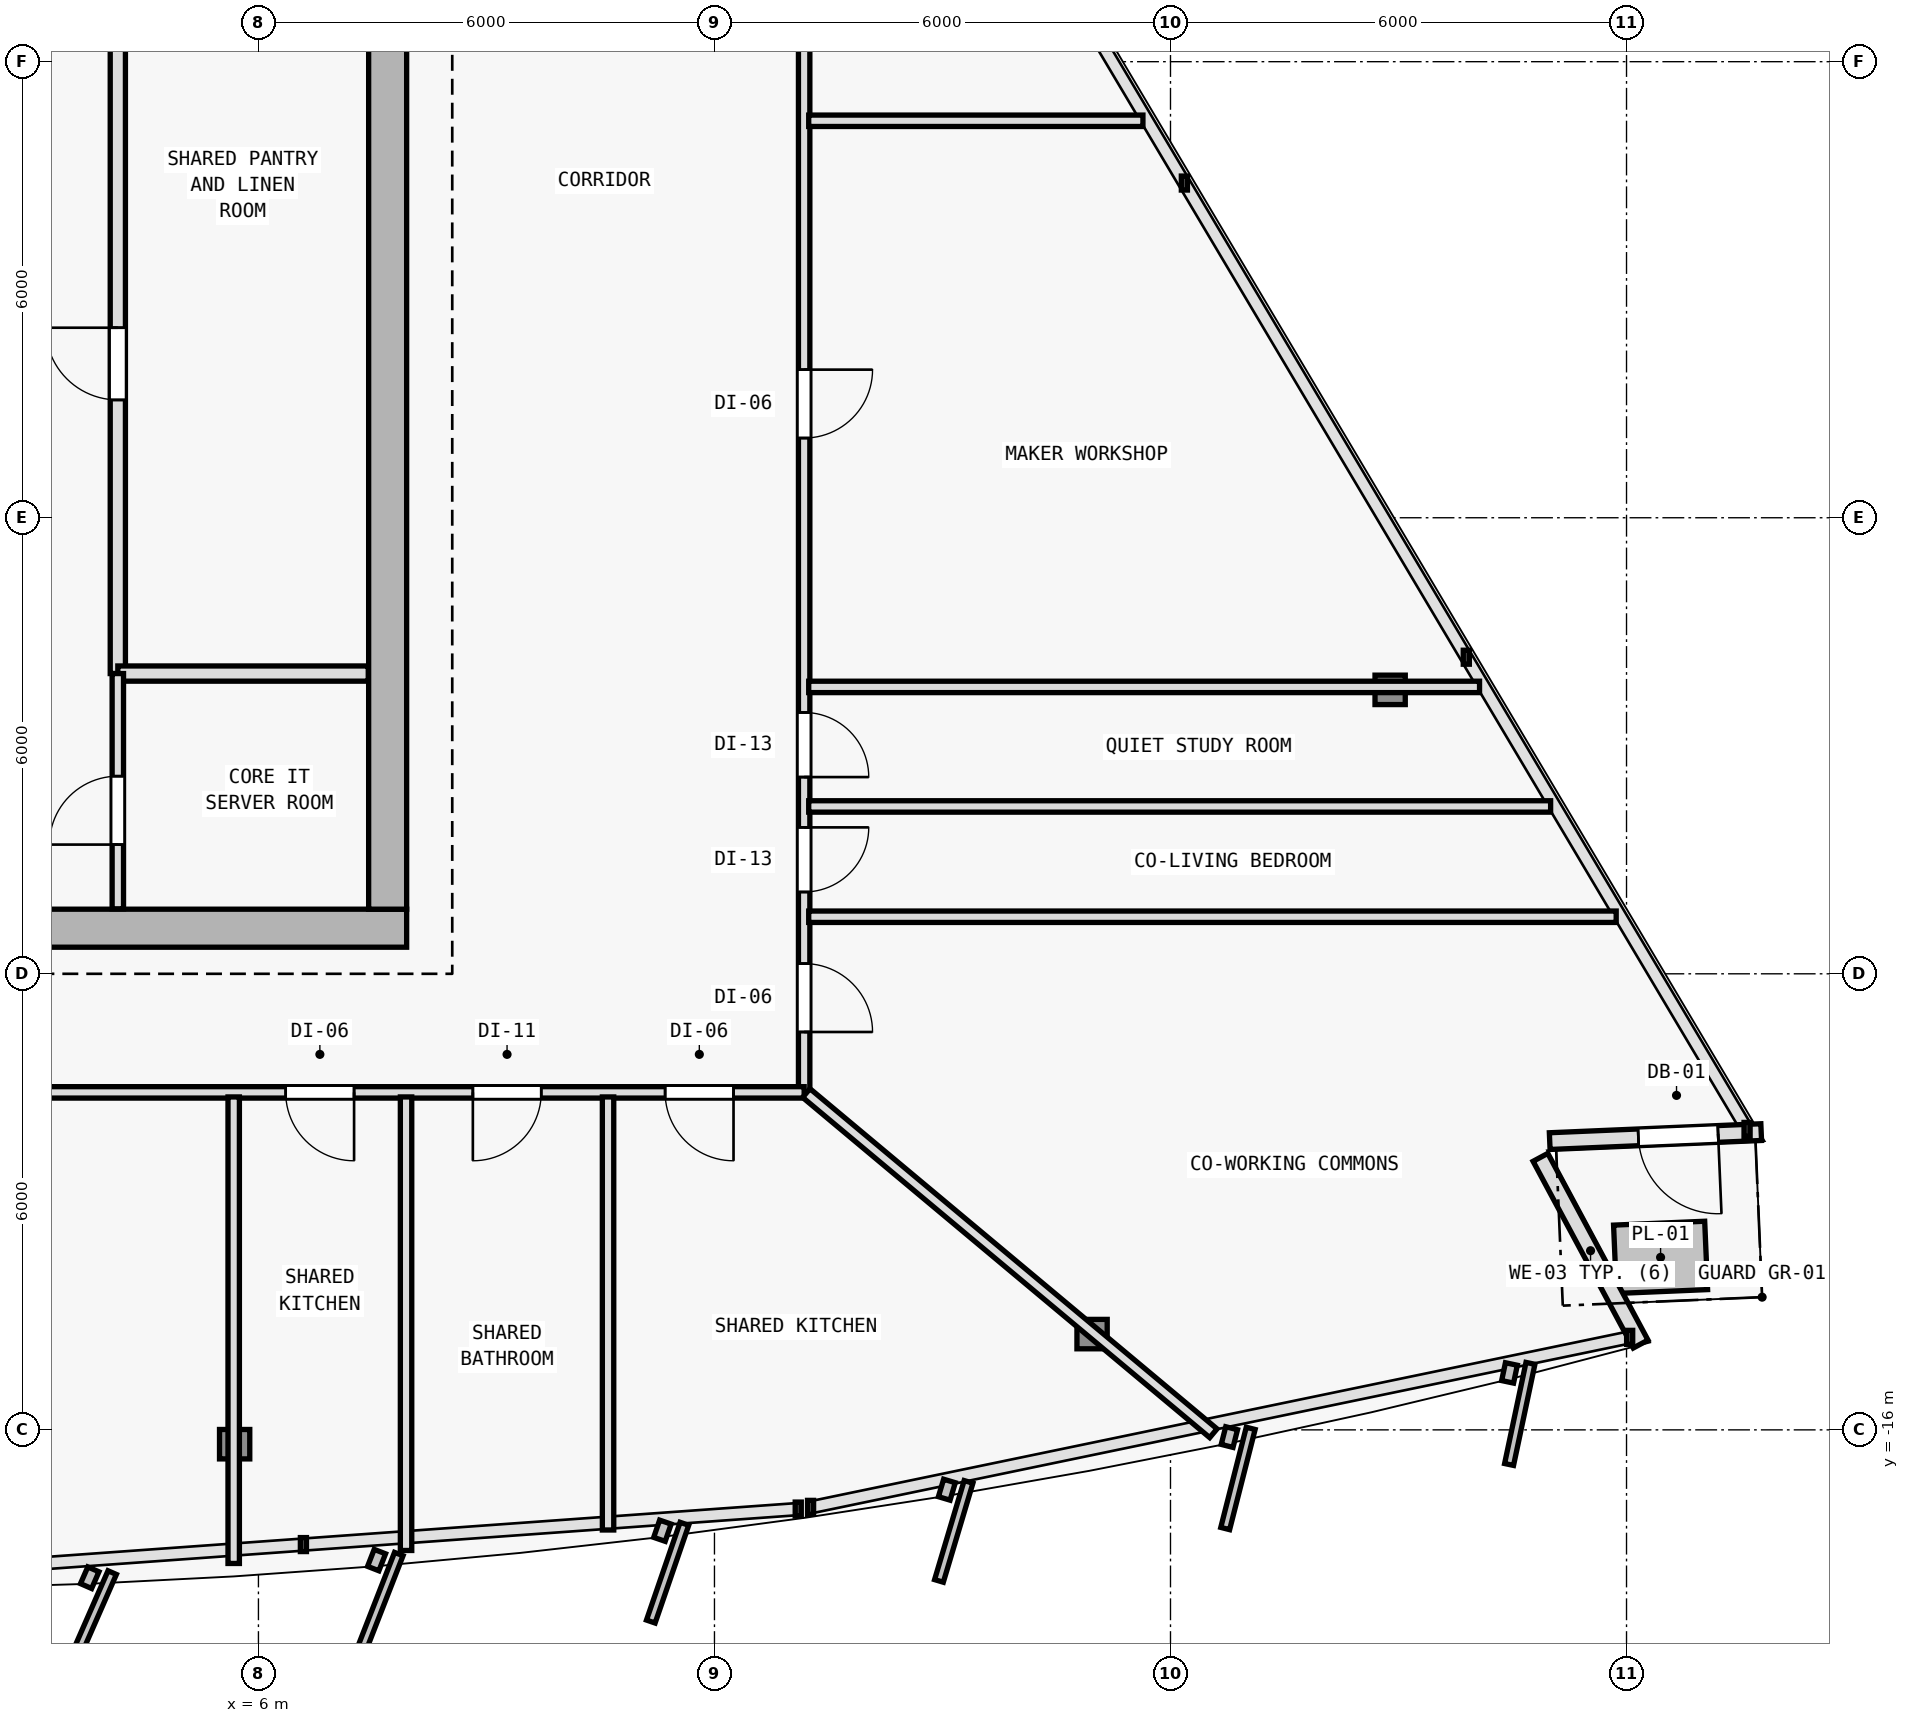
"""IFC4 building model, lengths in metres.
Left out: names, types, materials, properties, quantities, classifications, styles, units other than length and angle.
Written with IfcOpenShell. Run it as: python <this file> out.ifc"""

import sys

from ifc_helpers import new_model, si_unit, direction, frame, frame_2d, origin, origin_2d, place, context, subcontext, project, spatial, rectangle, i_section, extrude, element, fill, save


model = new_model("IFC4")
c1 = context("Model", 3, precision=1e-05, world=origin(), true_north=direction((0.0, 1.0)))
c2 = subcontext(c1, "Body", "Model", "MODEL_VIEW")
j1 = project(units=[si_unit("LENGTHUNIT", "METRE"), si_unit("PLANEANGLEUNIT", "RADIAN")], contexts=[c1])
p1 = place(None, origin())
s1 = spatial("IfcSite", under=j1, at=p1, CompositionType="ELEMENT")
p2 = place(p1, origin())
s2 = spatial("IfcBuilding", under=s1, at=p2, CompositionType="ELEMENT")
p3 = place(p2, frame((0.0, 0.0, 198.3)))
s3 = spatial("IfcBuildingStorey", under=s2, at=p3, CompositionType="ELEMENT", Elevation=198.3)
for number, where, z_axis, x_axis in (
    (1, (7.7, -9.4, 0.0), (0.0, 0.0, 1.0), (1.0, 0.0, 0.0)),
    (2, (7.7, 0.4, 0.0), (0.0, 0.0, 1.0), (1.0, 0.0, 0.0)),
):
    element("IfcColumn", number, at=place(p3, frame(where, z_axis=z_axis, x_axis=x_axis)), inside=s3, PredefinedType="COLUMN", context=c2, shape_type="SweptSolid", body=[
        extrude(i_section(OverallWidth=0.398, OverallDepth=0.387, WebThickness=0.013, FlangeThickness=0.022, FilletRadius=0.015, at=origin_2d()), origin(), (0.0, 0.0, 1.0), 3.6),
    ])
p4 = place(p3, frame((5.687, -16.188, 0.005), z_axis=(-0.00693381708, 0.03528089279, 0.999353381334), x_axis=(-0.981229659911, -0.192842823335, 0.0)))
e3 = element("IfcColumn", 3, at=p4, inside=s3, PredefinedType="COLUMN", context=c2, shape_type="SweptSolid", body=[
    extrude(i_section(OverallWidth=0.398, OverallDepth=0.387, WebThickness=0.013, FlangeThickness=0.022, FilletRadius=0.015, at=origin_2d()), origin(), (0.0, 0.0, 1.0), 3.592),
])
p5 = place(p3, frame((16.968, -14.74, 0.005), z_axis=(-0.020594893987, 0.033509183946, 0.999226193078), x_axis=(-0.851954850327, -0.523615252838, 0.0)))
e4 = element("IfcColumn", 4, at=p5, inside=s3, PredefinedType="COLUMN", context=c2, shape_type="SweptSolid", body=[
    extrude(i_section(OverallWidth=0.398, OverallDepth=0.387, WebThickness=0.013, FlangeThickness=0.022, FilletRadius=0.015, at=origin_2d()), origin(), (0.0, 0.0, 1.0), 3.592),
])
p6 = place(p3, frame((20.89, -6.264, 0.005), z_axis=(-0.026105663043, 0.021618752208, 0.999425396871), x_axis=(-0.637813971185, -0.770190455771, 0.0)))
e5 = element("IfcColumn", 5, at=p6, inside=s3, PredefinedType="COLUMN", context=c2, shape_type="SweptSolid", body=[
    extrude(i_section(OverallWidth=0.398, OverallDepth=0.387, WebThickness=0.013, FlangeThickness=0.022, FilletRadius=0.015, at=origin_2d()), origin(), (0.0, 0.0, 1.0), 3.591),
])
p7 = place(p3, frame((22.868, -12.415, 0.0), z_axis=(0.0, 0.0, 1.0), x_axis=(0.472845900162, -0.881145138272, 0.0)))
e6 = element("IfcWall", 6, at=p7, inside=s3, PredefinedType="SOLIDWALL", context=c2, shape_type="SweptSolid", body=[
    extrude(rectangle(XDim=2.788, YDim=0.22, at=frame_2d((1.394, 0.0))), origin(), (0.0, 0.0, 1.0), 3.35),
])
p8 = place(p3, frame((25.772, -12.083, 0.0), z_axis=(0.0, 0.0, 1.0), x_axis=(-0.999095761456, -0.042516578425, 0.0)))
e7 = element("IfcWall", 7, at=p8, inside=s3, PredefinedType="SOLIDWALL", context=c2, shape_type="SweptSolid", body=[
    extrude(rectangle(XDim=2.785, YDim=0.22, at=frame_2d((1.393, 0.0))), origin(), (0.0, 0.0, 1.0), 3.35),
])
p9 = place(p8, frame((0.567, 0.0, 0.0)))
e8 = element("IfcOpeningElement", 8, at=p9, cuts=e7, PredefinedType="OPENING", context=c2, shape_type="SweptSolid", body=[
    extrude(rectangle(XDim=1.05, YDim=2.15, at=frame_2d((0.525, 1.075))), frame((0.0, 0.12, 0.0), z_axis=(0.0, -1.0, 0.0), x_axis=(1.0, 0.0, 0.0)), (0.0, 0.0, 1.0), 0.24),
])
p10 = place(p3, frame((-7.95, -9.4, 0.0), z_axis=(0.0, 0.0, 1.0), x_axis=(1.0, 0.0, 0.0)))
e9 = element("IfcWall", 9, at=p10, inside=s3, PredefinedType="SHEAR", context=c2, shape_type="SweptSolid", body=[
    extrude(rectangle(XDim=15.9, YDim=0.5, at=frame_2d((7.95, 0.0))), origin(), (0.0, 0.0, 1.0), 3.35),
])
p11 = place(p10, frame((9.6, 0.0, 0.0)))
e10 = element("IfcOpeningElement", 10, at=p11, cuts=e9, PredefinedType="OPENING", context=c2, shape_type="SweptSolid", body=[
    extrude(rectangle(XDim=1.5, YDim=2.2, at=frame_2d((0.75, 1.1))), frame((0.0, 0.26, 0.0), z_axis=(0.0, -1.0, 0.0), x_axis=(1.0, 0.0, 0.0)), (0.0, 0.0, 1.0), 0.52),
])
p12 = place(p3, frame((7.7, 9.95, 0.0), z_axis=(0.0, 0.0, 1.0), x_axis=(0.0, -1.0, 0.0)))
e11 = element("IfcWall", 11, at=p12, inside=s3, PredefinedType="SHEAR", context=c2, shape_type="SweptSolid", body=[
    extrude(rectangle(XDim=19.1, YDim=0.5, at=frame_2d((9.55, 0.0))), origin(), (0.0, 0.0, 1.0), 3.35),
])
p13 = place(p3, frame((4.15, -6.05, 0.0), z_axis=(0.0, 0.0, 1.0), x_axis=(0.0, 1.0, 0.0)))
e12 = element("IfcWall", 12, at=p13, inside=s3, PredefinedType="SOLIDWALL", context=c2, shape_type="SweptSolid", body=[
    extrude(rectangle(XDim=8.7, YDim=0.2, at=frame_2d((4.35, 0.0))), origin(), (0.0, 0.0, 1.0), 3.35),
])
p14 = place(p13, frame((3.6, 0.0, 0.0)))
e13 = element("IfcOpeningElement", 13, at=p14, cuts=e12, PredefinedType="OPENING", context=c2, shape_type="SweptSolid", body=[
    extrude(rectangle(XDim=0.95, YDim=2.1, at=frame_2d((0.475, 1.05))), frame((0.0, 0.11, 0.0), z_axis=(0.0, -1.0, 0.0), x_axis=(1.0, 0.0, 0.0)), (0.0, 0.0, 1.0), 0.22),
])
p15 = place(p3, frame((4.15, -6.05, 0.0), z_axis=(0.0, 0.0, 1.0), x_axis=(1.0, 0.0, 0.0)))
e14 = element("IfcWall", 14, at=p15, inside=s3, PredefinedType="SOLIDWALL", context=c2, shape_type="SweptSolid", body=[
    extrude(rectangle(XDim=3.295, YDim=0.2, at=frame_2d((1.647, 0.0))), origin(), (0.0, 0.0, 1.0), 3.35),
])
p16 = place(p3, frame((4.15, -9.145, 0.0), z_axis=(0.0, 0.0, 1.0), x_axis=(0.0, 1.0, 0.0)))
e15 = element("IfcWall", 15, at=p16, inside=s3, PredefinedType="PARTITIONING", context=c2, shape_type="SweptSolid", body=[
    extrude(rectangle(XDim=3.095, YDim=0.15, at=frame_2d((1.547, 0.0))), origin(), (0.0, 0.0, 1.0), 3.35),
])
p17 = place(p16, frame((0.845, 0.0, 0.0)))
e16 = element("IfcOpeningElement", 16, at=p17, cuts=e15, PredefinedType="OPENING", context=c2, shape_type="SweptSolid", body=[
    extrude(rectangle(XDim=0.9, YDim=2.1, at=frame_2d((0.45, 1.05))), frame((0.0, 0.085, 0.0), z_axis=(0.0, -1.0, 0.0), x_axis=(1.0, 0.0, 0.0)), (0.0, 0.0, 1.0), 0.17),
])
p18 = place(p3, frame((13.18, 8.444, 0.0), z_axis=(0.0, 0.0, 1.0), x_axis=(0.0, -1.0, 0.0)))
e17 = element("IfcWall", 17, at=p18, inside=s3, PredefinedType="PARTITIONING", context=c2, shape_type="SweptSolid", body=[
    extrude(rectangle(XDim=20.004, YDim=0.15, at=frame_2d((10.002, 0.0))), origin(), (0.0, 0.0, 1.0), 2.825),
])
p19 = place(p18, frame((18.309, 0.0, 0.0)))
e18 = element("IfcOpeningElement", 18, at=p19, cuts=e17, PredefinedType="OPENING", context=c2, shape_type="SweptSolid", body=[
    extrude(rectangle(XDim=0.9, YDim=2.1, at=frame_2d((0.45, 1.05))), frame((0.0, 0.085, 0.0), z_axis=(0.0, -1.0, 0.0), x_axis=(1.0, 0.0, 0.0)), (0.0, 0.0, 1.0), 0.17),
])
p20 = place(p18, frame((16.518, 0.0, 0.0)))
e19 = element("IfcOpeningElement", 19, at=p20, cuts=e17, PredefinedType="OPENING", context=c2, shape_type="SweptSolid", body=[
    extrude(rectangle(XDim=0.85, YDim=2.1, at=frame_2d((0.425, 1.05))), frame((0.0, 0.085, 0.0), z_axis=(0.0, -1.0, 0.0), x_axis=(1.0, 0.0, 0.0)), (0.0, 0.0, 1.0), 0.17),
])
p21 = place(p18, frame((15.006, 0.0, 0.0)))
e20 = element("IfcOpeningElement", 20, at=p21, cuts=e17, PredefinedType="OPENING", context=c2, shape_type="SweptSolid", body=[
    extrude(rectangle(XDim=0.85, YDim=2.1, at=frame_2d((0.425, 1.05))), frame((0.0, 0.085, 0.0), z_axis=(0.0, -1.0, 0.0), x_axis=(1.0, 0.0, 0.0)), (0.0, 0.0, 1.0), 0.17),
])
p22 = place(p18, frame((10.495, 0.0, 0.0)))
e21 = element("IfcOpeningElement", 21, at=p22, cuts=e17, PredefinedType="OPENING", context=c2, shape_type="SweptSolid", body=[
    extrude(rectangle(XDim=0.9, YDim=2.1, at=frame_2d((0.45, 1.05))), frame((0.0, 0.085, 0.0), z_axis=(0.0, -1.0, 0.0), x_axis=(1.0, 0.0, 0.0)), (0.0, 0.0, 1.0), 0.17),
])
p23 = place(p3, frame((13.18, -11.56, 0.0), z_axis=(0.0, 0.0, 1.0), x_axis=(-1.0, 0.0, 0.0)))
e22 = element("IfcWall", 22, at=p23, inside=s3, PredefinedType="PARTITIONING", context=c2, shape_type="SweptSolid", body=[
    extrude(rectangle(XDim=23.04, YDim=0.15, at=frame_2d((11.52, 0.0))), origin(), (0.0, 0.0, 1.0), 2.725),
])
p24 = place(p23, frame((14.417, 0.0, 0.0)))
e23 = element("IfcOpeningElement", 23, at=p24, cuts=e22, PredefinedType="OPENING", context=c2, shape_type="SweptSolid", body=[
    extrude(rectangle(XDim=0.9, YDim=2.1, at=frame_2d((0.45, 1.05))), frame((0.0, 0.085, 0.0), z_axis=(0.0, -1.0, 0.0), x_axis=(1.0, 0.0, 0.0)), (0.0, 0.0, 1.0), 0.17),
])
p25 = place(p23, frame((5.922, 0.0, 0.0)))
e24 = element("IfcOpeningElement", 24, at=p25, cuts=e22, PredefinedType="OPENING", context=c2, shape_type="SweptSolid", body=[
    extrude(rectangle(XDim=0.9, YDim=2.1, at=frame_2d((0.45, 1.05))), frame((0.0, 0.085, 0.0), z_axis=(0.0, -1.0, 0.0), x_axis=(1.0, 0.0, 0.0)), (0.0, 0.0, 1.0), 0.17),
])
p26 = place(p23, frame((3.459, 0.0, 0.0)))
e25 = element("IfcOpeningElement", 25, at=p26, cuts=e22, PredefinedType="OPENING", context=c2, shape_type="SweptSolid", body=[
    extrude(rectangle(XDim=0.9, YDim=2.1, at=frame_2d((0.45, 1.05))), frame((0.0, 0.085, 0.0), z_axis=(0.0, -1.0, 0.0), x_axis=(1.0, 0.0, 0.0)), (0.0, 0.0, 1.0), 0.17),
])
p27 = place(p23, frame((0.929, 0.0, 0.0)))
e26 = element("IfcOpeningElement", 26, at=p27, cuts=e22, PredefinedType="OPENING", context=c2, shape_type="SweptSolid", body=[
    extrude(rectangle(XDim=0.9, YDim=2.1, at=frame_2d((0.45, 1.05))), frame((0.0, 0.085, 0.0), z_axis=(0.0, -1.0, 0.0), x_axis=(1.0, 0.0, 0.0)), (0.0, 0.0, 1.0), 0.17),
])
p28 = place(p3, frame((5.675, -11.62, 0.0), z_axis=(0.0, 0.0, 1.0), x_axis=(0.0, -1.0, 0.0)))
e27 = element("IfcWall", 27, at=p28, inside=s3, PredefinedType="PARTITIONING", context=c2, shape_type="SweptSolid", body=[
    extrude(rectangle(XDim=6.138, YDim=0.15, at=frame_2d((3.069, 0.0))), origin(), (0.0, 0.0, 1.0), 2.825),
])
p29 = place(p3, frame((13.208, -11.569, 0.0), z_axis=(0.0, 0.0, 1.0), x_axis=(0.767351890927, -0.641226228012, 0.0)))
e28 = element("IfcWall", 28, at=p29, inside=s3, PredefinedType="PARTITIONING", context=c2, shape_type="SweptSolid", body=[
    extrude(rectangle(XDim=6.98, YDim=0.15, at=frame_2d((3.49, 0.0))), origin(), (0.0, 0.0, 1.0), 2.825),
])
p30 = place(p3, frame((13.24, -6.226, 0.0), z_axis=(0.0, 0.0, 1.0), x_axis=(1.0, 0.0, 0.0)))
e29 = element("IfcWall", 29, at=p30, inside=s3, PredefinedType="PARTITIONING", context=c2, shape_type="SweptSolid", body=[
    extrude(rectangle(XDim=8.826, YDim=0.15, at=frame_2d((4.413, 0.0))), origin(), (0.0, 0.0, 1.0), 2.825),
])
p31 = place(p3, frame((10.6, -11.62, 0.0), z_axis=(0.0, 0.0, 1.0), x_axis=(0.0, -1.0, 0.0)))
e30 = element("IfcWall", 30, at=p31, inside=s3, PredefinedType="PARTITIONING", context=c2, shape_type="SweptSolid", body=[
    extrude(rectangle(XDim=5.697, YDim=0.15, at=frame_2d((2.849, 0.0))), origin(), (0.0, 0.0, 1.0), 2.825),
])
p32 = place(p3, frame((13.24, -9.249, 0.0), z_axis=(0.0, 0.0, 1.0), x_axis=(1.0, 0.0, 0.0)))
e31 = element("IfcWall", 31, at=p32, inside=s3, PredefinedType="PARTITIONING", context=c2, shape_type="SweptSolid", body=[
    extrude(rectangle(XDim=10.624, YDim=0.15, at=frame_2d((5.312, 0.0))), origin(), (0.0, 0.0, 1.0), 2.935),
])
p33 = place(p3, frame((7.942, -11.62, 0.0), z_axis=(0.0, 0.0, 1.0), x_axis=(0.0, -1.0, 0.0)))
e32 = element("IfcWall", 32, at=p33, inside=s3, PredefinedType="PARTITIONING", context=c2, shape_type="SweptSolid", body=[
    extrude(rectangle(XDim=5.967, YDim=0.15, at=frame_2d((2.983, 0.0))), origin(), (0.0, 0.0, 1.0), 2.825),
])
p34 = place(p3, frame((13.24, -7.798, 0.0), z_axis=(0.0, 0.0, 1.0), x_axis=(1.0, 0.0, 0.0)))
e33 = element("IfcWall", 33, at=p34, inside=s3, PredefinedType="PARTITIONING", context=c2, shape_type="SweptSolid", body=[
    extrude(rectangle(XDim=9.761, YDim=0.15, at=frame_2d((4.881, 0.0))), origin(), (0.0, 0.0, 1.0), 2.825),
])
p35 = place(p3, frame((13.24, 1.222, 0.0), z_axis=(0.0, 0.0, 1.0), x_axis=(1.0, 0.0, 0.0)))
e34 = element("IfcWall", 34, at=p35, inside=s3, PredefinedType="PARTITIONING", context=c2, shape_type="SweptSolid", body=[
    extrude(rectangle(XDim=4.397, YDim=0.15, at=frame_2d((2.199, 0.0))), origin(), (0.0, 0.0, 1.0), 2.935),
])
p36 = place(p9, origin())
e35 = element("IfcDoor", 35, at=p36, inside=s3, OperationType="SINGLE_SWING_LEFT", PredefinedType="DOOR", context=c2, shape_type="SweptSolid", body=[
    extrude(rectangle(XDim=1.05, YDim=2.15, at=frame_2d((0.525, 1.075))), frame((0.0, 0.025, 0.0), z_axis=(0.0, -1.0, 0.0), x_axis=(1.0, 0.0, 0.0)), (0.0, 0.0, 1.0), 0.05),
])
fill(e8, e35)
p37 = place(p14, origin())
e36 = element("IfcDoor", 36, at=p37, inside=s3, OperationType="SINGLE_SWING_RIGHT", PredefinedType="DOOR", context=c2, shape_type="SweptSolid", body=[
    extrude(rectangle(XDim=0.95, YDim=2.1, at=frame_2d((0.475, 1.05))), frame((0.0, 0.025, 0.0), z_axis=(0.0, -1.0, 0.0), x_axis=(1.0, 0.0, 0.0)), (0.0, 0.0, 1.0), 0.05),
])
fill(e13, e36)
p38 = place(p17, origin())
e37 = element("IfcDoor", 37, at=p38, inside=s3, OperationType="SINGLE_SWING_LEFT", PredefinedType="DOOR", context=c2, shape_type="SweptSolid", body=[
    extrude(rectangle(XDim=0.9, YDim=2.1, at=frame_2d((0.45, 1.05))), frame((0.0, 0.025, 0.0), z_axis=(0.0, -1.0, 0.0), x_axis=(1.0, 0.0, 0.0)), (0.0, 0.0, 1.0), 0.05),
])
fill(e16, e37)
p39 = place(p25, origin())
e38 = element("IfcDoor", 38, at=p39, inside=s3, OperationType="SINGLE_SWING_LEFT", PredefinedType="DOOR", context=c2, shape_type="SweptSolid", body=[
    extrude(rectangle(XDim=0.9, YDim=2.1, at=frame_2d((0.45, 1.05))), frame((0.0, 0.025, 0.0), z_axis=(0.0, -1.0, 0.0), x_axis=(1.0, 0.0, 0.0)), (0.0, 0.0, 1.0), 0.05),
])
fill(e24, e38)
p40 = place(p26, origin())
e39 = element("IfcDoor", 39, at=p40, inside=s3, OperationType="SINGLE_SWING_RIGHT", PredefinedType="DOOR", context=c2, shape_type="SweptSolid", body=[
    extrude(rectangle(XDim=0.9, YDim=2.1, at=frame_2d((0.45, 1.05))), frame((0.0, 0.025, 0.0), z_axis=(0.0, -1.0, 0.0), x_axis=(1.0, 0.0, 0.0)), (0.0, 0.0, 1.0), 0.05),
])
fill(e25, e39)
p41 = place(p27, origin())
e40 = element("IfcDoor", 40, at=p41, inside=s3, OperationType="SINGLE_SWING_LEFT", PredefinedType="DOOR", context=c2, shape_type="SweptSolid", body=[
    extrude(rectangle(XDim=0.9, YDim=2.1, at=frame_2d((0.45, 1.05))), frame((0.0, 0.025, 0.0), z_axis=(0.0, -1.0, 0.0), x_axis=(1.0, 0.0, 0.0)), (0.0, 0.0, 1.0), 0.05),
])
fill(e26, e40)
p42 = place(p19, origin())
e41 = element("IfcDoor", 41, at=p42, inside=s3, OperationType="SINGLE_SWING_RIGHT", PredefinedType="DOOR", context=c2, shape_type="SweptSolid", body=[
    extrude(rectangle(XDim=0.9, YDim=2.1, at=frame_2d((0.45, 1.05))), frame((0.0, 0.025, 0.0), z_axis=(0.0, -1.0, 0.0), x_axis=(1.0, 0.0, 0.0)), (0.0, 0.0, 1.0), 0.05),
])
fill(e18, e41)
p43 = place(p20, origin())
e42 = element("IfcDoor", 42, at=p43, inside=s3, OperationType="SINGLE_SWING_LEFT", PredefinedType="DOOR", context=c2, shape_type="SweptSolid", body=[
    extrude(rectangle(XDim=0.85, YDim=2.1, at=frame_2d((0.425, 1.05))), frame((0.0, 0.025, 0.0), z_axis=(0.0, -1.0, 0.0), x_axis=(1.0, 0.0, 0.0)), (0.0, 0.0, 1.0), 0.05),
])
fill(e19, e42)
p44 = place(p21, origin())
e43 = element("IfcDoor", 43, at=p44, inside=s3, OperationType="SINGLE_SWING_RIGHT", PredefinedType="DOOR", context=c2, shape_type="SweptSolid", body=[
    extrude(rectangle(XDim=0.85, YDim=2.1, at=frame_2d((0.425, 1.05))), frame((0.0, 0.025, 0.0), z_axis=(0.0, -1.0, 0.0), x_axis=(1.0, 0.0, 0.0)), (0.0, 0.0, 1.0), 0.05),
])
fill(e20, e43)
p45 = place(p22, origin())
e44 = element("IfcDoor", 44, at=p45, inside=s3, OperationType="SINGLE_SWING_LEFT", PredefinedType="DOOR", context=c2, shape_type="SweptSolid", body=[
    extrude(rectangle(XDim=0.9, YDim=2.1, at=frame_2d((0.45, 1.05))), frame((0.0, 0.025, 0.0), z_axis=(0.0, -1.0, 0.0), x_axis=(1.0, 0.0, 0.0)), (0.0, 0.0, 1.0), 0.05),
])
fill(e21, e44)
save(model, sys.argv[1])
